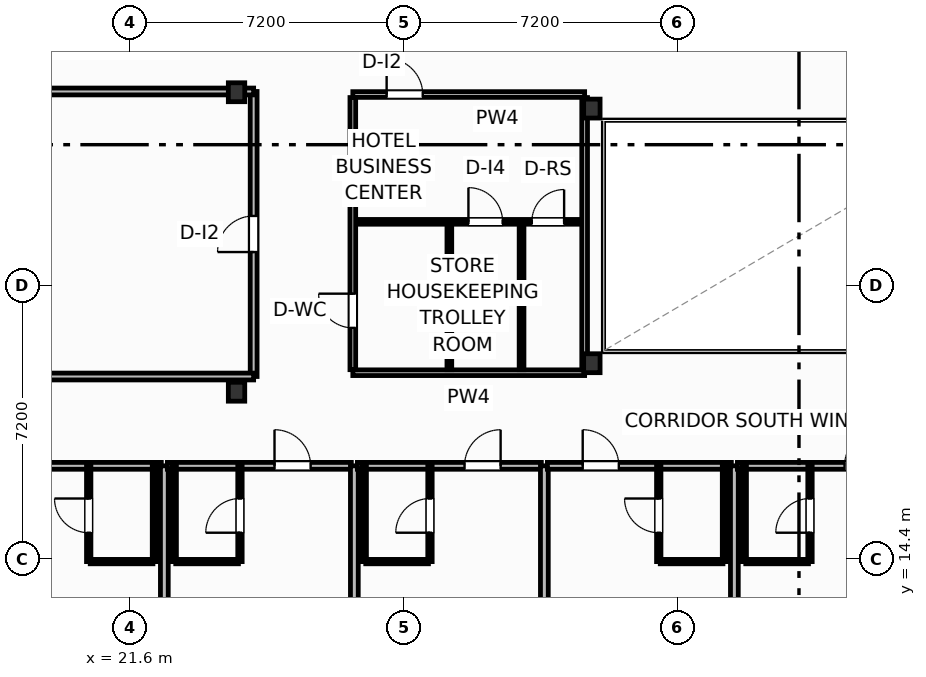
"""IFC4 building model, lengths in metres.
Left out: names, types, materials, properties, quantities, classifications, styles, units other than length and angle.
Written with IfcOpenShell. Run it as: python <this file> out.ifc"""

import sys

from ifc_helpers import new_model, si_unit, direction, frame, frame_2d, origin, origin_2d, place, context, subcontext, project, spatial, rectangle, i_section, extrude, element, fill, save


model = new_model("IFC4")
c1 = context("Model", 3, precision=1e-05, world=origin(), true_north=direction((0.0, 1.0)))
c2 = subcontext(c1, "Body", "Model", "MODEL_VIEW")
j1 = project(units=[si_unit("LENGTHUNIT", "METRE"), si_unit("PLANEANGLEUNIT", "RADIAN")], contexts=[c1])
p1 = place(None, origin())
s1 = spatial("IfcSite", under=j1, at=p1, CompositionType="ELEMENT")
p2 = place(p1, origin())
s2 = spatial("IfcBuilding", under=s1, at=p2, CompositionType="ELEMENT")
p3 = place(p2, frame((0.0, 0.0, 34.4)))
s3 = spatial("IfcBuildingStorey", under=s2, at=p3, CompositionType="ELEMENT", Elevation=34.4)
for number, where, z_axis, x_axis in (
    (1, (33.75, 19.55, 0.0), (0.0, 0.0, 1.0), (1.0, 0.0, 0.0)),
    (2, (33.75, 26.25, 0.0), (0.0, 0.0, 1.0), (1.0, 0.0, 0.0)),
    (3, (24.4, 18.8, 0.0), (0.0, 0.0, 1.0), (1.0, 0.0, 0.0)),
    (4, (24.4, 26.68, 0.0), (0.0, 0.0, 1.0), (1.0, 0.0, 0.0)),
):
    element("IfcColumn", number, at=place(p3, frame(where, z_axis=z_axis, x_axis=x_axis)), inside=s3, PredefinedType="COLUMN", context=c2, shape_type="SweptSolid", body=[
        extrude(i_section(OverallWidth=0.432, OverallDepth=0.498, WebThickness=0.056, FlangeThickness=0.089, FilletRadius=0.025, at=origin_2d()), origin(), (0.0, 0.0, 1.0), 3.7),
    ])
p4 = place(p3, frame((17.58, 16.85, 0.0), z_axis=(0.0, 0.0, 1.0), x_axis=(1.0, 0.0, 0.0)))
e5 = element("IfcWall", 5, at=p4, inside=s3, PredefinedType="PARTITIONING", context=c2, shape_type="SweptSolid", body=[
    extrude(rectangle(XDim=4.84, YDim=0.18, at=frame_2d((2.42, 0.0))), origin(), (0.0, 0.0, 1.0), 3.45),
])
p5 = place(p4, frame((0.929, 0.0, 0.0)))
e6 = element("IfcOpeningElement", 6, at=p5, cuts=e5, PredefinedType="OPENING", context=c2, shape_type="SweptSolid", body=[
    extrude(rectangle(XDim=0.95, YDim=2.15, at=frame_2d((0.475, 1.075))), frame((0.0, 0.1, 0.0), z_axis=(0.0, -1.0, 0.0), x_axis=(1.0, 0.0, 0.0)), (0.0, 0.0, 1.0), 0.2),
])
p6 = place(p3, frame((20.55, 14.33, 0.0), z_axis=(0.0, 0.0, 1.0), x_axis=(1.0, 0.0, 0.0)))
e7 = element("IfcWall", 7, at=p6, inside=s3, PredefinedType="PARTITIONING", context=c2, shape_type="SweptSolid", body=[
    extrude(rectangle(XDim=1.65, YDim=0.115, at=frame_2d((0.825, 0.0))), origin(), (0.0, 0.0, 1.0), 3.45),
])
p7 = place(p3, frame((20.51, 14.33, 0.0), z_axis=(0.0, 0.0, 1.0), x_axis=(0.0, 1.0, 0.0)))
e8 = element("IfcWall", 8, at=p7, inside=s3, PredefinedType="PARTITIONING", context=c2, shape_type="SweptSolid", body=[
    extrude(rectangle(XDim=2.52, YDim=0.115, at=frame_2d((1.26, 0.0))), origin(), (0.0, 0.0, 1.0), 3.45),
])
p8 = place(p7, frame((0.76, 0.0, 0.0)))
e9 = element("IfcOpeningElement", 9, at=p8, cuts=e8, PredefinedType="OPENING", context=c2, shape_type="SweptSolid", body=[
    extrude(rectangle(XDim=0.9, YDim=2.05, at=frame_2d((0.45, 1.025))), frame((0.0, 0.067, 0.0), z_axis=(0.0, -1.0, 0.0), x_axis=(1.0, 0.0, 0.0)), (0.0, 0.0, 1.0), 0.135),
])
p9 = place(p3, frame((22.24, 14.33, 0.0), z_axis=(0.0, 0.0, 1.0), x_axis=(0.0, 1.0, 0.0)))
e10 = element("IfcWall", 10, at=p9, inside=s3, PredefinedType="PARTITIONING", context=c2, shape_type="SweptSolid", body=[
    extrude(rectangle(XDim=2.52, YDim=0.115, at=frame_2d((1.26, 0.0))), origin(), (0.0, 0.0, 1.0), 3.45),
])
p10 = place(p3, frame((22.5, 8.802, 0.0), z_axis=(0.0, 0.0, 1.0), x_axis=(0.0, 1.0, 0.0)))
e11 = element("IfcWall", 11, at=p10, inside=s3, PredefinedType="PARTITIONING", context=c2, shape_type="SweptSolid", body=[
    extrude(rectangle(XDim=8.048, YDim=0.205, at=frame_2d((4.024, 0.0))), origin(), (0.0, 0.0, 1.0), 3.45),
])
p11 = place(p3, frame((22.58, 16.85, 0.0), z_axis=(0.0, 0.0, 1.0), x_axis=(1.0, 0.0, 0.0)))
e12 = element("IfcWall", 12, at=p11, inside=s3, PredefinedType="PARTITIONING", context=c2, shape_type="SweptSolid", body=[
    extrude(rectangle(XDim=4.84, YDim=0.18, at=frame_2d((2.42, 0.0))), origin(), (0.0, 0.0, 1.0), 3.45),
])
p12 = place(p11, frame((2.819, 0.0, 0.0)))
e13 = element("IfcOpeningElement", 13, at=p12, cuts=e12, PredefinedType="OPENING", context=c2, shape_type="SweptSolid", body=[
    extrude(rectangle(XDim=0.95, YDim=2.15, at=frame_2d((0.475, 1.075))), frame((0.0, 0.1, 0.0), z_axis=(0.0, -1.0, 0.0), x_axis=(1.0, 0.0, 0.0)), (0.0, 0.0, 1.0), 0.2),
])
p13 = place(p3, frame((22.8, 14.33, 0.0), z_axis=(0.0, 0.0, 1.0), x_axis=(1.0, 0.0, 0.0)))
e14 = element("IfcWall", 14, at=p13, inside=s3, PredefinedType="PARTITIONING", context=c2, shape_type="SweptSolid", body=[
    extrude(rectangle(XDim=1.65, YDim=0.115, at=frame_2d((0.825, 0.0))), origin(), (0.0, 0.0, 1.0), 3.45),
])
p14 = place(p3, frame((24.49, 14.33, 0.0), z_axis=(0.0, 0.0, 1.0), x_axis=(0.0, 1.0, 0.0)))
e15 = element("IfcWall", 15, at=p14, inside=s3, PredefinedType="PARTITIONING", context=c2, shape_type="SweptSolid", body=[
    extrude(rectangle(XDim=2.52, YDim=0.115, at=frame_2d((1.26, 0.0))), origin(), (0.0, 0.0, 1.0), 3.45),
])
p15 = place(p14, frame((0.76, 0.0, 0.0)))
e16 = element("IfcOpeningElement", 16, at=p15, cuts=e15, PredefinedType="OPENING", context=c2, shape_type="SweptSolid", body=[
    extrude(rectangle(XDim=0.9, YDim=2.05, at=frame_2d((0.45, 1.025))), frame((0.0, 0.067, 0.0), z_axis=(0.0, -1.0, 0.0), x_axis=(1.0, 0.0, 0.0)), (0.0, 0.0, 1.0), 0.135),
])
p16 = place(p3, frame((22.76, 14.33, 0.0), z_axis=(0.0, 0.0, 1.0), x_axis=(0.0, 1.0, 0.0)))
e17 = element("IfcWall", 17, at=p16, inside=s3, PredefinedType="PARTITIONING", context=c2, shape_type="SweptSolid", body=[
    extrude(rectangle(XDim=2.52, YDim=0.115, at=frame_2d((1.26, 0.0))), origin(), (0.0, 0.0, 1.0), 3.45),
])
p17 = place(p3, frame((27.5, 2.808, 0.0), z_axis=(0.0, 0.0, 1.0), x_axis=(0.0, 1.0, 0.0)))
e18 = element("IfcWall", 18, at=p17, inside=s3, PredefinedType="PARTITIONING", context=c2, shape_type="SweptSolid", body=[
    extrude(rectangle(XDim=14.042, YDim=0.205, at=frame_2d((7.021, 0.0))), origin(), (0.0, 0.0, 1.0), 3.45),
])
p18 = place(p3, frame((27.58, 16.85, 0.0), z_axis=(0.0, 0.0, 1.0), x_axis=(1.0, 0.0, 0.0)))
e19 = element("IfcWall", 19, at=p18, inside=s3, PredefinedType="PARTITIONING", context=c2, shape_type="SweptSolid", body=[
    extrude(rectangle(XDim=4.84, YDim=0.18, at=frame_2d((2.42, 0.0))), origin(), (0.0, 0.0, 1.0), 3.45),
])
p19 = place(p18, frame((2.819, 0.0, 0.0)))
e20 = element("IfcOpeningElement", 20, at=p19, cuts=e19, PredefinedType="OPENING", context=c2, shape_type="SweptSolid", body=[
    extrude(rectangle(XDim=0.95, YDim=2.15, at=frame_2d((0.475, 1.075))), frame((0.0, 0.1, 0.0), z_axis=(0.0, -1.0, 0.0), x_axis=(1.0, 0.0, 0.0)), (0.0, 0.0, 1.0), 0.2),
])
p20 = place(p3, frame((27.8, 14.33, 0.0), z_axis=(0.0, 0.0, 1.0), x_axis=(1.0, 0.0, 0.0)))
e21 = element("IfcWall", 21, at=p20, inside=s3, PredefinedType="PARTITIONING", context=c2, shape_type="SweptSolid", body=[
    extrude(rectangle(XDim=1.65, YDim=0.115, at=frame_2d((0.825, 0.0))), origin(), (0.0, 0.0, 1.0), 3.45),
])
p21 = place(p3, frame((29.49, 14.33, 0.0), z_axis=(0.0, 0.0, 1.0), x_axis=(0.0, 1.0, 0.0)))
e22 = element("IfcWall", 22, at=p21, inside=s3, PredefinedType="PARTITIONING", context=c2, shape_type="SweptSolid", body=[
    extrude(rectangle(XDim=2.52, YDim=0.115, at=frame_2d((1.26, 0.0))), origin(), (0.0, 0.0, 1.0), 3.45),
])
p22 = place(p21, frame((0.76, 0.0, 0.0)))
e23 = element("IfcOpeningElement", 23, at=p22, cuts=e22, PredefinedType="OPENING", context=c2, shape_type="SweptSolid", body=[
    extrude(rectangle(XDim=0.9, YDim=2.05, at=frame_2d((0.45, 1.025))), frame((0.0, 0.067, 0.0), z_axis=(0.0, -1.0, 0.0), x_axis=(1.0, 0.0, 0.0)), (0.0, 0.0, 1.0), 0.135),
])
p23 = place(p3, frame((27.76, 14.33, 0.0), z_axis=(0.0, 0.0, 1.0), x_axis=(0.0, 1.0, 0.0)))
e24 = element("IfcWall", 24, at=p23, inside=s3, PredefinedType="PARTITIONING", context=c2, shape_type="SweptSolid", body=[
    extrude(rectangle(XDim=2.52, YDim=0.115, at=frame_2d((1.26, 0.0))), origin(), (0.0, 0.0, 1.0), 3.45),
])
p24 = place(p3, frame((32.5, 1.914, 0.0), z_axis=(0.0, 0.0, 1.0), x_axis=(0.0, 1.0, 0.0)))
e25 = element("IfcWall", 25, at=p24, inside=s3, PredefinedType="PARTITIONING", context=c2, shape_type="SweptSolid", body=[
    extrude(rectangle(XDim=14.936, YDim=0.205, at=frame_2d((7.468, 0.0))), origin(), (0.0, 0.0, 1.0), 2.58),
])
p25 = place(p3, frame((32.58, 16.85, 0.0), z_axis=(0.0, 0.0, 1.0), x_axis=(1.0, 0.0, 0.0)))
e26 = element("IfcWall", 26, at=p25, inside=s3, PredefinedType="PARTITIONING", context=c2, shape_type="SweptSolid", body=[
    extrude(rectangle(XDim=4.84, YDim=0.18, at=frame_2d((2.42, 0.0))), origin(), (0.0, 0.0, 1.0), 3.45),
])
p26 = place(p25, frame((0.929, 0.0, 0.0)))
e27 = element("IfcOpeningElement", 27, at=p26, cuts=e26, PredefinedType="OPENING", context=c2, shape_type="SweptSolid", body=[
    extrude(rectangle(XDim=0.95, YDim=2.15, at=frame_2d((0.475, 1.075))), frame((0.0, 0.1, 0.0), z_axis=(0.0, -1.0, 0.0), x_axis=(1.0, 0.0, 0.0)), (0.0, 0.0, 1.0), 0.2),
])
p27 = place(p3, frame((35.55, 14.33, 0.0), z_axis=(0.0, 0.0, 1.0), x_axis=(1.0, 0.0, 0.0)))
e28 = element("IfcWall", 28, at=p27, inside=s3, PredefinedType="PARTITIONING", context=c2, shape_type="SweptSolid", body=[
    extrude(rectangle(XDim=1.65, YDim=0.115, at=frame_2d((0.825, 0.0))), origin(), (0.0, 0.0, 1.0), 3.45),
])
p28 = place(p3, frame((35.51, 14.33, 0.0), z_axis=(0.0, 0.0, 1.0), x_axis=(0.0, 1.0, 0.0)))
e29 = element("IfcWall", 29, at=p28, inside=s3, PredefinedType="PARTITIONING", context=c2, shape_type="SweptSolid", body=[
    extrude(rectangle(XDim=2.52, YDim=0.115, at=frame_2d((1.26, 0.0))), origin(), (0.0, 0.0, 1.0), 3.45),
])
p29 = place(p28, frame((0.76, 0.0, 0.0)))
e30 = element("IfcOpeningElement", 30, at=p29, cuts=e29, PredefinedType="OPENING", context=c2, shape_type="SweptSolid", body=[
    extrude(rectangle(XDim=0.9, YDim=2.05, at=frame_2d((0.45, 1.025))), frame((0.0, 0.067, 0.0), z_axis=(0.0, -1.0, 0.0), x_axis=(1.0, 0.0, 0.0)), (0.0, 0.0, 1.0), 0.135),
])
p30 = place(p3, frame((37.24, 14.33, 0.0), z_axis=(0.0, 0.0, 1.0), x_axis=(0.0, 1.0, 0.0)))
e31 = element("IfcWall", 31, at=p30, inside=s3, PredefinedType="PARTITIONING", context=c2, shape_type="SweptSolid", body=[
    extrude(rectangle(XDim=2.52, YDim=0.115, at=frame_2d((1.26, 0.0))), origin(), (0.0, 0.0, 1.0), 3.45),
])
p31 = place(p3, frame((37.5, -4.0, 0.0), z_axis=(0.0, 0.0, 1.0), x_axis=(0.0, 1.0, 0.0)))
e32 = element("IfcWall", 32, at=p31, inside=s3, PredefinedType="PARTITIONING", context=c2, shape_type="SweptSolid", body=[
    extrude(rectangle(XDim=20.85, YDim=0.205, at=frame_2d((10.425, 0.0))), origin(), (0.0, 0.0, 1.0), 3.45),
])
p32 = place(p3, frame((37.58, 16.85, 0.0), z_axis=(0.0, 0.0, 1.0), x_axis=(1.0, 0.0, 0.0)))
e33 = element("IfcWall", 33, at=p32, inside=s3, PredefinedType="PARTITIONING", context=c2, shape_type="SweptSolid", body=[
    extrude(rectangle(XDim=4.84, YDim=0.18, at=frame_2d((2.42, 0.0))), origin(), (0.0, 0.0, 1.0), 3.45),
])
p33 = place(p32, frame((2.819, 0.0, 0.0)))
e34 = element("IfcOpeningElement", 34, at=p33, cuts=e33, PredefinedType="OPENING", context=c2, shape_type="SweptSolid", body=[
    extrude(rectangle(XDim=0.95, YDim=2.15, at=frame_2d((0.475, 1.075))), frame((0.0, 0.1, 0.0), z_axis=(0.0, -1.0, 0.0), x_axis=(1.0, 0.0, 0.0)), (0.0, 0.0, 1.0), 0.2),
])
p34 = place(p3, frame((37.8, 14.33, 0.0), z_axis=(0.0, 0.0, 1.0), x_axis=(1.0, 0.0, 0.0)))
e35 = element("IfcWall", 35, at=p34, inside=s3, PredefinedType="PARTITIONING", context=c2, shape_type="SweptSolid", body=[
    extrude(rectangle(XDim=1.65, YDim=0.115, at=frame_2d((0.825, 0.0))), origin(), (0.0, 0.0, 1.0), 3.45),
])
p35 = place(p3, frame((39.49, 14.33, 0.0), z_axis=(0.0, 0.0, 1.0), x_axis=(0.0, 1.0, 0.0)))
e36 = element("IfcWall", 36, at=p35, inside=s3, PredefinedType="PARTITIONING", context=c2, shape_type="SweptSolid", body=[
    extrude(rectangle(XDim=2.52, YDim=0.115, at=frame_2d((1.26, 0.0))), origin(), (0.0, 0.0, 1.0), 3.45),
])
p36 = place(p35, frame((0.76, 0.0, 0.0)))
e37 = element("IfcOpeningElement", 37, at=p36, cuts=e36, PredefinedType="OPENING", context=c2, shape_type="SweptSolid", body=[
    extrude(rectangle(XDim=0.9, YDim=2.05, at=frame_2d((0.45, 1.025))), frame((0.0, 0.067, 0.0), z_axis=(0.0, -1.0, 0.0), x_axis=(1.0, 0.0, 0.0)), (0.0, 0.0, 1.0), 0.135),
])
p37 = place(p3, frame((37.76, 14.33, 0.0), z_axis=(0.0, 0.0, 1.0), x_axis=(0.0, 1.0, 0.0)))
e38 = element("IfcWall", 38, at=p37, inside=s3, PredefinedType="PARTITIONING", context=c2, shape_type="SweptSolid", body=[
    extrude(rectangle(XDim=2.52, YDim=0.115, at=frame_2d((1.26, 0.0))), origin(), (0.0, 0.0, 1.0), 3.45),
])
p38 = place(p3, frame((24.85, 19.2, 0.0), z_axis=(0.0, 0.0, 1.0), x_axis=(0.0, 1.0, 0.0)))
e39 = element("IfcWall", 39, at=p38, inside=s3, PredefinedType="PARTITIONING", context=c2, shape_type="SweptSolid", body=[
    extrude(rectangle(XDim=7.5, YDim=0.18, at=frame_2d((3.75, 0.0))), origin(), (0.0, 0.0, 1.0), 3.45),
])
p39 = place(p38, frame((3.275, 0.0, 0.0)))
e40 = element("IfcOpeningElement", 40, at=p39, cuts=e39, PredefinedType="OPENING", context=c2, shape_type="SweptSolid", body=[
    extrude(rectangle(XDim=0.95, YDim=2.05, at=frame_2d((0.475, 1.025))), frame((0.0, 0.1, 0.0), z_axis=(0.0, -1.0, 0.0), x_axis=(1.0, 0.0, 0.0)), (0.0, 0.0, 1.0), 0.2),
])
p40 = place(p3, frame((3.703, 19.2, 0.0), z_axis=(0.0, 0.0, 1.0), x_axis=(1.0, 0.0, 0.0)))
e41 = element("IfcWall", 41, at=p40, inside=s3, PredefinedType="PARTITIONING", context=c2, shape_type="SweptSolid", body=[
    extrude(rectangle(XDim=21.147, YDim=0.18, at=frame_2d((10.574, 0.0))), origin(), (0.0, 0.0, 1.0), 2.58),
])
p41 = place(p3, frame((0.2, 26.7, 0.0), z_axis=(0.0, 0.0, 1.0), x_axis=(1.0, 0.0, 0.0)))
e42 = element("IfcWall", 42, at=p41, inside=s3, PredefinedType="PARTITIONING", context=c2, shape_type="SweptSolid", body=[
    extrude(rectangle(XDim=24.65, YDim=0.18, at=frame_2d((12.325, 0.0))), origin(), (0.0, 0.0, 1.0), 2.662),
])
p42 = place(p3, frame((27.46, 26.62, 0.0), z_axis=(0.0, 0.0, 1.0), x_axis=(1.0, 0.0, 0.0)))
e43 = element("IfcWall", 43, at=p42, inside=s3, PredefinedType="PARTITIONING", context=c2, shape_type="SweptSolid", body=[
    extrude(rectangle(XDim=6.1, YDim=0.15, at=frame_2d((3.05, 0.0))), origin(), (0.0, 0.0, 1.0), 2.662),
])
p43 = place(p42, frame((0.89, 0.0, 0.0)))
e44 = element("IfcOpeningElement", 44, at=p43, cuts=e43, PredefinedType="OPENING", context=c2, shape_type="SweptSolid", body=[
    extrude(rectangle(XDim=0.95, YDim=2.05, at=frame_2d((0.475, 1.025))), frame((0.0, 0.085, 0.0), z_axis=(0.0, -1.0, 0.0), x_axis=(1.0, 0.0, 0.0)), (0.0, 0.0, 1.0), 0.17),
])
p44 = place(p3, frame((27.46, 19.3, 0.0), z_axis=(0.0, 0.0, 1.0), x_axis=(1.0, 0.0, 0.0)))
e45 = element("IfcWall", 45, at=p44, inside=s3, PredefinedType="PARTITIONING", context=c2, shape_type="SweptSolid", body=[
    extrude(rectangle(XDim=6.1, YDim=0.15, at=frame_2d((3.05, 0.0))), origin(), (0.0, 0.0, 1.0), 2.662),
])
p45 = place(p3, frame((27.52, 23.27, 0.0), z_axis=(0.0, 0.0, 1.0), x_axis=(1.0, 0.0, 0.0)))
e46 = element("IfcWall", 46, at=p45, inside=s3, PredefinedType="PARTITIONING", context=c2, shape_type="SweptSolid", body=[
    extrude(rectangle(XDim=6.0, YDim=0.125, at=frame_2d((3.0, 0.0))), origin(), (0.0, 0.0, 1.0), 3.45),
])
p46 = place(p45, frame((2.982, 0.0, 0.0)))
e47 = element("IfcOpeningElement", 47, at=p46, cuts=e46, PredefinedType="OPENING", context=c2, shape_type="SweptSolid", body=[
    extrude(rectangle(XDim=0.9, YDim=2.05, at=frame_2d((0.45, 1.025))), frame((0.0, 0.073, 0.0), z_axis=(0.0, -1.0, 0.0), x_axis=(1.0, 0.0, 0.0)), (0.0, 0.0, 1.0), 0.145),
])
p47 = place(p45, frame((4.65, 0.0, 0.0)))
e48 = element("IfcOpeningElement", 48, at=p47, cuts=e46, PredefinedType="OPENING", context=c2, shape_type="SweptSolid", body=[
    extrude(rectangle(XDim=0.85, YDim=2.05, at=frame_2d((0.425, 1.025))), frame((0.0, 0.073, 0.0), z_axis=(0.0, -1.0, 0.0), x_axis=(1.0, 0.0, 0.0)), (0.0, 0.0, 1.0), 0.145),
])
for number, where, z_axis, x_axis in (
    (49, (30.0, 19.38, 0.0), (0.0, 0.0, 1.0), (0.0, 1.0, 0.0)),
    (50, (31.9, 19.38, 0.0), (0.0, 0.0, 1.0), (0.0, 1.0, 0.0)),
):
    element("IfcWall", number, at=place(p3, frame(where, z_axis=z_axis, x_axis=x_axis)), inside=s3, PredefinedType="PARTITIONING", context=c2, shape_type="SweptSolid", body=[
        extrude(rectangle(XDim=3.82, YDim=0.125, at=frame_2d((1.91, 0.0))), origin(), (0.0, 0.0, 1.0), 3.45),
    ])
p48 = place(p3, frame((27.46, 19.38, 0.0), z_axis=(0.0, 0.0, 1.0), x_axis=(0.0, 1.0, 0.0)))
e51 = element("IfcWall", 51, at=p48, inside=s3, PredefinedType="PARTITIONING", context=c2, shape_type="SweptSolid", body=[
    extrude(rectangle(XDim=7.16, YDim=0.15, at=frame_2d((3.58, 0.0))), origin(), (0.0, 0.0, 1.0), 3.45),
])
p49 = place(p48, frame((1.1, 0.0, 0.0)))
e52 = element("IfcOpeningElement", 52, at=p49, cuts=e51, PredefinedType="OPENING", context=c2, shape_type="SweptSolid", body=[
    extrude(rectangle(XDim=0.9, YDim=2.05, at=frame_2d((0.45, 1.025))), frame((0.0, 0.085, 0.0), z_axis=(0.0, -1.0, 0.0), x_axis=(1.0, 0.0, 0.0)), (0.0, 0.0, 1.0), 0.17),
])
p50 = place(p3, frame((33.56, 19.38, 0.0), z_axis=(0.0, 0.0, 1.0), x_axis=(0.0, 1.0, 0.0)))
e53 = element("IfcWall", 53, at=p50, inside=s3, PredefinedType="PARTITIONING", context=c2, shape_type="SweptSolid", body=[
    extrude(rectangle(XDim=7.16, YDim=0.15, at=frame_2d((3.58, 0.0))), origin(), (0.0, 0.0, 1.0), 2.824),
])
p51 = place(p8, origin())
e54 = element("IfcDoor", 54, at=p51, inside=s3, OperationType="SINGLE_SWING_RIGHT", PredefinedType="DOOR", context=c2, shape_type="SweptSolid", body=[
    extrude(rectangle(XDim=0.9, YDim=2.05, at=frame_2d((0.45, 1.025))), frame((0.0, 0.025, 0.0), z_axis=(0.0, -1.0, 0.0), x_axis=(1.0, 0.0, 0.0)), (0.0, 0.0, 1.0), 0.05),
])
fill(e9, e54)
p52 = place(p12, origin())
e55 = element("IfcDoor", 55, at=p52, inside=s3, OperationType="SINGLE_SWING_LEFT", PredefinedType="DOOR", context=c2, shape_type="SweptSolid", body=[
    extrude(rectangle(XDim=0.95, YDim=2.15, at=frame_2d((0.475, 1.075))), frame((0.0, 0.025, 0.0), z_axis=(0.0, -1.0, 0.0), x_axis=(1.0, 0.0, 0.0)), (0.0, 0.0, 1.0), 0.05),
])
fill(e13, e55)
p53 = place(p15, origin())
e56 = element("IfcDoor", 56, at=p53, inside=s3, OperationType="SINGLE_SWING_LEFT", PredefinedType="DOOR", context=c2, shape_type="SweptSolid", body=[
    extrude(rectangle(XDim=0.9, YDim=2.05, at=frame_2d((0.45, 1.025))), frame((0.0, 0.025, 0.0), z_axis=(0.0, -1.0, 0.0), x_axis=(1.0, 0.0, 0.0)), (0.0, 0.0, 1.0), 0.05),
])
fill(e16, e56)
p54 = place(p19, origin())
e57 = element("IfcDoor", 57, at=p54, inside=s3, OperationType="SINGLE_SWING_RIGHT", PredefinedType="DOOR", context=c2, shape_type="SweptSolid", body=[
    extrude(rectangle(XDim=0.95, YDim=2.15, at=frame_2d((0.475, 1.075))), frame((0.0, 0.025, 0.0), z_axis=(0.0, -1.0, 0.0), x_axis=(1.0, 0.0, 0.0)), (0.0, 0.0, 1.0), 0.05),
])
fill(e20, e57)
p55 = place(p22, origin())
e58 = element("IfcDoor", 58, at=p55, inside=s3, OperationType="SINGLE_SWING_LEFT", PredefinedType="DOOR", context=c2, shape_type="SweptSolid", body=[
    extrude(rectangle(XDim=0.9, YDim=2.05, at=frame_2d((0.45, 1.025))), frame((0.0, 0.025, 0.0), z_axis=(0.0, -1.0, 0.0), x_axis=(1.0, 0.0, 0.0)), (0.0, 0.0, 1.0), 0.05),
])
fill(e23, e58)
p56 = place(p26, origin())
e59 = element("IfcDoor", 59, at=p56, inside=s3, OperationType="SINGLE_SWING_LEFT", PredefinedType="DOOR", context=c2, shape_type="SweptSolid", body=[
    extrude(rectangle(XDim=0.95, YDim=2.15, at=frame_2d((0.475, 1.075))), frame((0.0, 0.025, 0.0), z_axis=(0.0, -1.0, 0.0), x_axis=(1.0, 0.0, 0.0)), (0.0, 0.0, 1.0), 0.05),
])
fill(e27, e59)
p57 = place(p29, origin())
e60 = element("IfcDoor", 60, at=p57, inside=s3, OperationType="SINGLE_SWING_RIGHT", PredefinedType="DOOR", context=c2, shape_type="SweptSolid", body=[
    extrude(rectangle(XDim=0.9, YDim=2.05, at=frame_2d((0.45, 1.025))), frame((0.0, 0.025, 0.0), z_axis=(0.0, -1.0, 0.0), x_axis=(1.0, 0.0, 0.0)), (0.0, 0.0, 1.0), 0.05),
])
fill(e30, e60)
p58 = place(p33, origin())
e61 = element("IfcDoor", 61, at=p58, inside=s3, OperationType="SINGLE_SWING_RIGHT", PredefinedType="DOOR", context=c2, shape_type="SweptSolid", body=[
    extrude(rectangle(XDim=0.95, YDim=2.15, at=frame_2d((0.475, 1.075))), frame((0.0, 0.025, 0.0), z_axis=(0.0, -1.0, 0.0), x_axis=(1.0, 0.0, 0.0)), (0.0, 0.0, 1.0), 0.05),
])
fill(e34, e61)
p59 = place(p36, origin())
e62 = element("IfcDoor", 62, at=p59, inside=s3, OperationType="SINGLE_SWING_LEFT", PredefinedType="DOOR", context=c2, shape_type="SweptSolid", body=[
    extrude(rectangle(XDim=0.9, YDim=2.05, at=frame_2d((0.45, 1.025))), frame((0.0, 0.025, 0.0), z_axis=(0.0, -1.0, 0.0), x_axis=(1.0, 0.0, 0.0)), (0.0, 0.0, 1.0), 0.05),
])
fill(e37, e62)
p60 = place(p39, origin())
e63 = element("IfcDoor", 63, at=p60, inside=s3, OperationType="SINGLE_SWING_LEFT", PredefinedType="DOOR", context=c2, shape_type="SweptSolid", body=[
    extrude(rectangle(XDim=0.95, YDim=2.05, at=frame_2d((0.475, 1.025))), frame((0.0, 0.025, 0.0), z_axis=(0.0, -1.0, 0.0), x_axis=(1.0, 0.0, 0.0)), (0.0, 0.0, 1.0), 0.05),
])
fill(e40, e63)
p61 = place(p43, origin())
e64 = element("IfcDoor", 64, at=p61, inside=s3, OperationType="SINGLE_SWING_LEFT", PredefinedType="DOOR", context=c2, shape_type="SweptSolid", body=[
    extrude(rectangle(XDim=0.95, YDim=2.05, at=frame_2d((0.475, 1.025))), frame((0.0, 0.025, 0.0), z_axis=(0.0, -1.0, 0.0), x_axis=(1.0, 0.0, 0.0)), (0.0, 0.0, 1.0), 0.05),
])
fill(e44, e64)
p62 = place(p46, origin())
e65 = element("IfcDoor", 65, at=p62, inside=s3, OperationType="SINGLE_SWING_LEFT", PredefinedType="DOOR", context=c2, shape_type="SweptSolid", body=[
    extrude(rectangle(XDim=0.9, YDim=2.05, at=frame_2d((0.45, 1.025))), frame((0.0, 0.025, 0.0), z_axis=(0.0, -1.0, 0.0), x_axis=(1.0, 0.0, 0.0)), (0.0, 0.0, 1.0), 0.05),
])
fill(e47, e65)
p63 = place(p47, origin())
e66 = element("IfcDoor", 66, at=p63, inside=s3, OperationType="SINGLE_SWING_RIGHT", PredefinedType="DOOR", context=c2, shape_type="SweptSolid", body=[
    extrude(rectangle(XDim=0.85, YDim=2.05, at=frame_2d((0.425, 1.025))), frame((0.0, 0.025, 0.0), z_axis=(0.0, -1.0, 0.0), x_axis=(1.0, 0.0, 0.0)), (0.0, 0.0, 1.0), 0.05),
])
fill(e48, e66)
p64 = place(p49, origin())
e67 = element("IfcDoor", 67, at=p64, inside=s3, OperationType="SINGLE_SWING_RIGHT", PredefinedType="DOOR", context=c2, shape_type="SweptSolid", body=[
    extrude(rectangle(XDim=0.9, YDim=2.05, at=frame_2d((0.45, 1.025))), frame((0.0, 0.025, 0.0), z_axis=(0.0, -1.0, 0.0), x_axis=(1.0, 0.0, 0.0)), (0.0, 0.0, 1.0), 0.05),
])
fill(e52, e67)
save(model, sys.argv[1])
